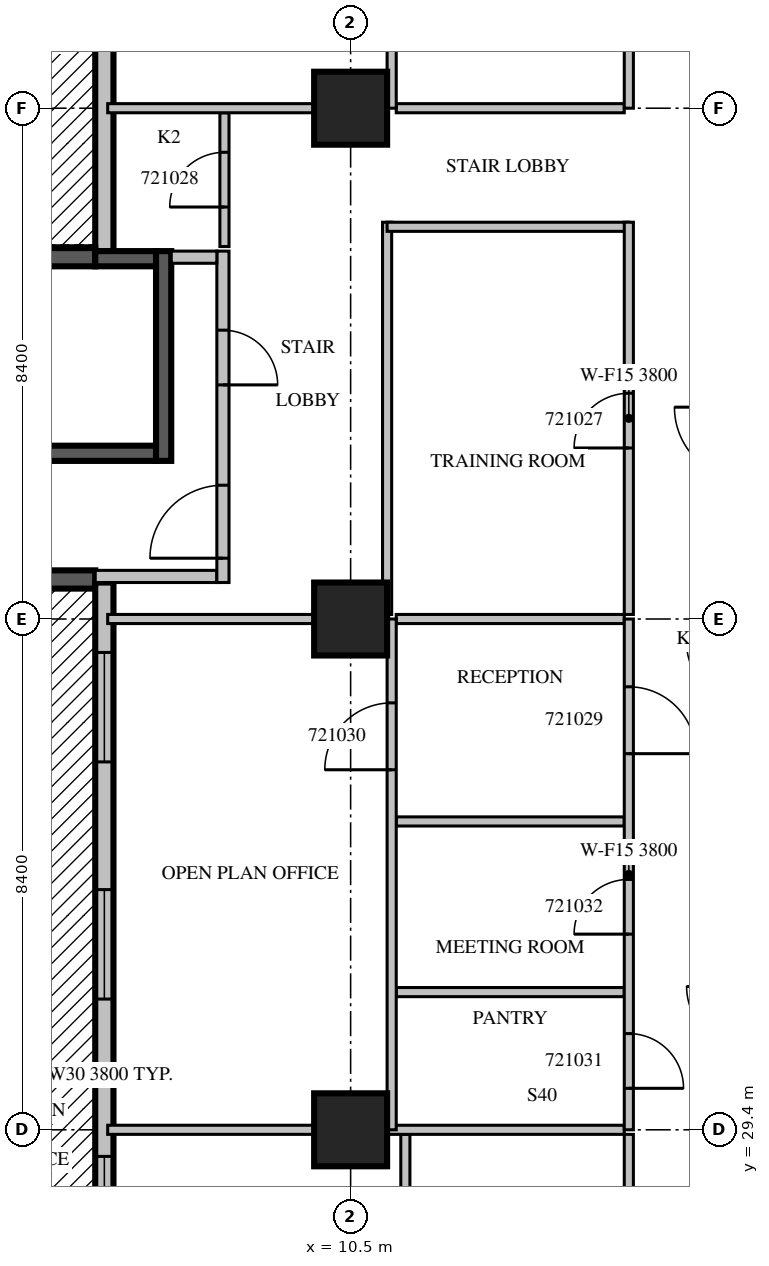
"""IFC4 building model, lengths in metres.
Left out: names, types, materials, properties, quantities, classifications, styles, units other than length and angle.
Written with IfcOpenShell. Run it as: python <this file> out.ifc"""

import sys

from ifc_helpers import new_model, si_unit, direction, frame, frame_2d, origin, origin_2d, place, context, subcontext, project, spatial, rectangle, extrude, source, transform, mapped, element, fill, save


model = new_model("IFC4")
c1 = context("Model", 3, precision=1e-05, world=origin(), true_north=direction((0.0, 1.0)))
c2 = subcontext(c1, "Body", "Model", "MODEL_VIEW")
j1 = project(units=[si_unit("LENGTHUNIT", "METRE"), si_unit("PLANEANGLEUNIT", "RADIAN")], contexts=[c1])
p1 = place(None, origin())
s1 = spatial("IfcSite", under=j1, at=p1, CompositionType="ELEMENT")
p2 = place(p1, origin())
s2 = spatial("IfcBuilding", under=s1, at=p2, CompositionType="ELEMENT")
p3 = place(p2, frame((0.0, 0.0, 99.3)))
s3 = spatial("IfcBuildingStorey", under=s2, at=p3, CompositionType="ELEMENT", Elevation=99.3)
m1 = source(origin(), c2, "Body", "SweptSolid", [
    extrude(rectangle(XDim=1.2, YDim=1.2, at=origin_2d()), origin(), (0.0, 0.0, 1.0), 4.2),
])
for number, where, z_axis, x_axis in (
    (1, (10.5, 29.4, 0.0), (0.0, 0.0, 1.0), (1.0, 0.0, 0.0)),
    (2, (10.5, 37.8, 0.0), (0.0, 0.0, 1.0), (1.0, 0.0, 0.0)),
    (3, (10.5, 46.2, 0.0), (0.0, 0.0, 1.0), (1.0, 0.0, 0.0)),
):
    element("IfcColumn", number, at=place(p3, frame(where, z_axis=z_axis, x_axis=x_axis)), inside=s3, PredefinedType="COLUMN", context=c2, shape_type="MappedRepresentation", body=[
        mapped(m1, transform((0.0, 0.0, 0.0), scale=1.0)),
    ])
p4 = place(p3, frame((6.45, 53.76, 0.0), z_axis=(0.0, 0.0, 1.0), x_axis=(0.0, -1.0, 0.0)))
e4 = element("IfcWall", 4, at=p4, inside=s3, PredefinedType="STANDARD", context=c2, shape_type="SweptSolid", body=[
    extrude(rectangle(XDim=9.91, YDim=0.3, at=frame_2d((4.955, 0.0))), origin(), (0.0, 0.0, 1.0), 3.8),
])
m2 = source(origin(), c2, "Body", "SweptSolid", [
    extrude(rectangle(XDim=1.8, YDim=2.4, at=frame_2d((0.9, 1.2))), frame((0.0, 0.16, 0.0), z_axis=(0.0, -1.0, 0.0), x_axis=(1.0, 0.0, 0.0)), (0.0, 0.0, 1.0), 0.32),
])
p5 = place(p4, frame((4.29, 0.0, 0.0)))
e5 = element("IfcOpeningElement", 5, at=p5, cuts=e4, PredefinedType="OPENING", context=c2, shape_type="MappedRepresentation", body=[
    mapped(m2, transform((0.0, 0.0, 0.0), scale=1.0)),
])
m3 = source(origin(), c2, "Body", "SweptSolid", [
    extrude(rectangle(XDim=2.4, YDim=2.7, at=frame_2d((1.2, 1.35))), frame((0.0, 0.16, 0.0), z_axis=(0.0, -1.0, 0.0), x_axis=(1.0, 0.0, 0.0)), (0.0, 0.0, 1.0), 0.32),
])
p6 = place(p4, frame((0.895, 0.0, 0.6)))
e6 = element("IfcOpeningElement", 6, at=p6, cuts=e4, PredefinedType="OPENING", context=c2, shape_type="MappedRepresentation", body=[
    mapped(m3, transform((0.0, 0.0, 0.0), scale=1.0)),
])
p7 = place(p3, frame((6.3, 43.75, 0.0), z_axis=(0.0, 0.0, 1.0), x_axis=(-1.0, 0.0, 0.0)))
e7 = element("IfcWall", 7, at=p7, inside=s3, PredefinedType="SOLIDWALL", context=c2, shape_type="SweptSolid", body=[
    extrude(rectangle(XDim=6.1, YDim=0.3, at=frame_2d((3.05, 0.0))), origin(), (0.0, 0.0, 1.0), 3.8),
])
m4 = source(origin(), c2, "Body", "SweptSolid", [
    extrude(rectangle(XDim=6.1, YDim=0.3, at=frame_2d((3.05, 0.0))), origin(), (0.0, 0.0, 1.0), 3.8),
])
p8 = place(p3, frame((0.2, 38.45, 0.0), z_axis=(0.0, 0.0, 1.0), x_axis=(1.0, 0.0, 0.0)))
e8 = element("IfcWall", 8, at=p8, inside=s3, PredefinedType="SOLIDWALL", context=c2, shape_type="MappedRepresentation", body=[
    mapped(m4, transform((0.0, 0.0, 0.0), scale=1.0)),
])
p9 = place(p3, frame((6.45, 38.4, 0.0), z_axis=(0.0, 0.0, 1.0), x_axis=(0.0, -1.0, 0.0)))
e9 = element("IfcWall", 9, at=p9, inside=s3, PredefinedType="STANDARD", context=c2, shape_type="SweptSolid", body=[
    extrude(rectangle(XDim=16.2, YDim=0.3, at=frame_2d((8.1, 0.0))), origin(), (0.0, 0.0, 1.0), 3.8),
])
p10 = place(p9, frame((1.15, 0.0, 0.0)))
e10 = element("IfcOpeningElement", 10, at=p10, cuts=e9, PredefinedType="OPENING", context=c2, shape_type="MappedRepresentation", body=[
    mapped(m2, transform((0.0, 0.0, 0.0), scale=1.0)),
])
p11 = place(p9, frame((5.05, 0.0, 0.0)))
e11 = element("IfcOpeningElement", 11, at=p11, cuts=e9, PredefinedType="OPENING", context=c2, shape_type="MappedRepresentation", body=[
    mapped(m2, transform((0.0, 0.0, 0.0), scale=1.0)),
])
m5 = source(origin(), c2, "Body", "SweptSolid", [
    extrude(rectangle(XDim=1.8, YDim=2.7, at=frame_2d((0.9, 1.35))), frame((0.0, 0.16, 0.0), z_axis=(0.0, -1.0, 0.0), x_axis=(1.0, 0.0, 0.0)), (0.0, 0.0, 1.0), 0.32),
])
p12 = place(p9, frame((9.438, 0.0, 0.6)))
e12 = element("IfcOpeningElement", 12, at=p12, cuts=e9, PredefinedType="OPENING", context=c2, shape_type="MappedRepresentation", body=[
    mapped(m5, transform((0.0, 0.0, 0.0), scale=1.0)),
])
p13 = place(p9, frame((13.3, 0.0, 0.0)))
e13 = element("IfcOpeningElement", 13, at=p13, cuts=e9, PredefinedType="OPENING", context=c2, shape_type="MappedRepresentation", body=[
    mapped(m2, transform((0.0, 0.0, 0.0), scale=1.0)),
])
m6 = source(origin(), c2, "Body", "SweptSolid", [
    extrude(rectangle(XDim=7.0, YDim=0.25, at=frame_2d((3.5, 0.0))), origin(), (0.0, 0.0, 1.0), 3.8),
])
p14 = place(p3, frame((0.3, 40.525, 0.0), z_axis=(0.0, 0.0, 1.0), x_axis=(1.0, 0.0, 0.0)))
e14 = element("IfcWall", 14, at=p14, inside=s3, PredefinedType="SOLIDWALL", context=c2, shape_type="MappedRepresentation", body=[
    mapped(m6, transform((0.0, 0.0, 0.0), scale=1.0)),
])
m7 = source(origin(), c2, "Body", "SweptSolid", [
    extrude(rectangle(XDim=1.1, YDim=2.1, at=frame_2d((0.55, 1.05))), frame((0.0, 0.135, 0.0), z_axis=(0.0, -1.0, 0.0), x_axis=(1.0, 0.0, 0.0)), (0.0, 0.0, 1.0), 0.27),
])
p15 = place(p14, frame((0.55, 0.0, 0.0)))
e15 = element("IfcOpeningElement", 15, at=p15, cuts=e14, PredefinedType="OPENING", context=c2, shape_type="MappedRepresentation", body=[
    mapped(m7, transform((0.0, 0.0, 0.0), scale=1.0)),
])
p16 = place(p3, frame((6.3, 43.725, 0.0), z_axis=(0.0, 0.0, 1.0), x_axis=(1.0, 0.0, 0.0)))
e16 = element("IfcWall", 16, at=p16, inside=s3, PredefinedType="SOLIDWALL", context=c2, shape_type="SweptSolid", body=[
    extrude(rectangle(XDim=1.0, YDim=0.25, at=frame_2d((0.5, 0.0))), origin(), (0.0, 0.0, 1.0), 3.8),
])
m8 = source(origin(), c2, "Body", "SweptSolid", [
    extrude(rectangle(XDim=3.45, YDim=0.25, at=frame_2d((1.725, 0.0))), origin(), (0.0, 0.0, 1.0), 3.8),
])
p17 = place(p3, frame((7.425, 40.4, 0.0), z_axis=(0.0, 0.0, 1.0), x_axis=(0.0, 1.0, 0.0)))
e17 = element("IfcWall", 17, at=p17, inside=s3, PredefinedType="SOLIDWALL", context=c2, shape_type="MappedRepresentation", body=[
    mapped(m8, transform((0.0, 0.0, 0.0), scale=1.0)),
])
p18 = place(p3, frame((6.3, 38.5, 0.0), z_axis=(0.0, 0.0, 1.0), x_axis=(1.0, 0.0, 0.0)))
e18 = element("IfcWall", 18, at=p18, inside=s3, PredefinedType="PARTITIONING", context=c2, shape_type="SweptSolid", body=[
    extrude(rectangle(XDim=2.0, YDim=0.2, at=frame_2d((1.0, 0.0))), origin(), (0.0, 0.0, 1.0), 3.8),
])
m9 = source(origin(), c2, "Body", "SweptSolid", [
    extrude(rectangle(XDim=5.45, YDim=0.2, at=frame_2d((2.725, 0.0))), origin(), (0.0, 0.0, 1.0), 3.8),
])
p19 = place(p3, frame((8.4, 38.4, 0.0), z_axis=(0.0, 0.0, 1.0), x_axis=(0.0, 1.0, 0.0)))
e19 = element("IfcWall", 19, at=p19, inside=s3, PredefinedType="PARTITIONING", context=c2, shape_type="MappedRepresentation", body=[
    mapped(m9, transform((0.0, 0.0, 0.0), scale=1.0)),
])
m10 = source(origin(), c2, "Body", "SweptSolid", [
    extrude(rectangle(XDim=1.2, YDim=2.1, at=frame_2d((0.6, 1.05))), frame((0.0, 0.11, 0.0), z_axis=(0.0, -1.0, 0.0), x_axis=(1.0, 0.0, 0.0)), (0.0, 0.0, 1.0), 0.22),
])
p20 = place(p19, frame((0.4, 0.0, 0.0)))
e20 = element("IfcOpeningElement", 20, at=p20, cuts=e19, PredefinedType="OPENING", context=c2, shape_type="MappedRepresentation", body=[
    mapped(m10, transform((0.0, 0.0, 0.0), scale=1.0)),
])
m11 = source(origin(), c2, "Body", "SweptSolid", [
    extrude(rectangle(XDim=0.9, YDim=2.1, at=frame_2d((0.45, 1.05))), frame((0.0, 0.11, 0.0), z_axis=(0.0, -1.0, 0.0), x_axis=(1.0, 0.0, 0.0)), (0.0, 0.0, 1.0), 0.22),
])
p21 = place(p19, frame((3.25, 0.0, 0.0)))
e21 = element("IfcOpeningElement", 21, at=p21, cuts=e19, PredefinedType="OPENING", context=c2, shape_type="MappedRepresentation", body=[
    mapped(m11, transform((0.0, 0.0, 0.0), scale=1.0)),
])
m12 = source(origin(), c2, "Body", "SweptSolid", [
    extrude(rectangle(XDim=0.75, YDim=0.2, at=frame_2d((0.375, 0.0))), origin(), (0.0, 0.0, 1.0), 3.8),
])
p22 = place(p3, frame((7.55, 43.75, 0.0), z_axis=(0.0, 0.0, 1.0), x_axis=(1.0, 0.0, 0.0)))
e22 = element("IfcWall", 22, at=p22, inside=s3, PredefinedType="PARTITIONING", context=c2, shape_type="MappedRepresentation", body=[
    mapped(m12, transform((0.0, 0.0, 0.0), scale=1.0)),
])
m13 = source(origin(), c2, "Body", "SweptSolid", [
    extrude(rectangle(XDim=3.65, YDim=0.15, at=frame_2d((1.825, 0.0))), origin(), (0.0, 0.0, 1.0), 3.8),
])
for number, where, z_axis, x_axis in (
    (23, (11.4, 25.675, 0.0), (0.0, 0.0, 1.0), (0.0, 1.0, 0.0)),
    (24, (15.075, 25.675, 0.0), (0.0, 0.0, 1.0), (0.0, 1.0, 0.0)),
):
    element("IfcWall", number, at=place(p3, frame(where, z_axis=z_axis, x_axis=x_axis)), inside=s3, PredefinedType="PARTITIONING", context=c2, shape_type="MappedRepresentation", body=[
        mapped(m13, transform((0.0, 0.0, 0.0), scale=1.0)),
    ])
p23 = place(p3, frame((9.901, 29.4, 0.0), z_axis=(0.0, 0.0, 1.0), x_axis=(-1.0, 0.0, 0.0)))
e25 = element("IfcWall", 25, at=p23, inside=s3, PredefinedType="PARTITIONING", context=c2, shape_type="SweptSolid", body=[
    extrude(rectangle(XDim=3.396, YDim=0.15, at=frame_2d((1.698, 0.0))), origin(), (0.0, 0.0, 1.0), 3.8),
])
m14 = source(origin(), c2, "Body", "SweptSolid", [
    extrude(rectangle(XDim=3.901, YDim=0.15, at=frame_2d((1.95, 0.0))), origin(), (0.0, 0.0, 1.0), 3.8),
])
p24 = place(p3, frame((15.0, 29.4, 0.0), z_axis=(0.0, 0.0, 1.0), x_axis=(-1.0, 0.0, 0.0)))
e26 = element("IfcWall", 26, at=p24, inside=s3, PredefinedType="PARTITIONING", context=c2, shape_type="MappedRepresentation", body=[
    mapped(m14, transform((0.0, 0.0, 0.0), scale=1.0)),
])
m15 = source(origin(), c2, "Body", "SweptSolid", [
    extrude(rectangle(XDim=6.45, YDim=0.15, at=frame_2d((3.225, 0.0))), origin(), (0.0, 0.0, 1.0), 3.8),
])
p25 = place(p3, frame((11.1, 44.325, 0.0), z_axis=(0.0, 0.0, 1.0), x_axis=(0.0, -1.0, 0.0)))
e27 = element("IfcWall", 27, at=p25, inside=s3, PredefinedType="PARTITIONING", context=c2, shape_type="MappedRepresentation", body=[
    mapped(m15, transform((0.0, 0.0, 0.0), scale=1.0)),
])
m16 = source(origin(), c2, "Body", "SweptSolid", [
    extrude(rectangle(XDim=3.975, YDim=0.15, at=frame_2d((1.988, 0.0))), origin(), (0.0, 0.0, 1.0), 3.8),
])
p26 = place(p3, frame((15.075, 44.25, 0.0), z_axis=(0.0, 0.0, 1.0), x_axis=(-1.0, 0.0, 0.0)))
e28 = element("IfcWall", 28, at=p26, inside=s3, PredefinedType="PARTITIONING", context=c2, shape_type="MappedRepresentation", body=[
    mapped(m16, transform((0.0, 0.0, 0.0), scale=1.0)),
])
p27 = place(p3, frame((15.075, 37.875, 0.0), z_axis=(0.0, 0.0, 1.0), x_axis=(0.0, 1.0, 0.0)))
e29 = element("IfcWall", 29, at=p27, inside=s3, PredefinedType="PARTITIONING", context=c2, shape_type="MappedRepresentation", body=[
    mapped(m15, transform((0.0, 0.0, 0.0), scale=1.0)),
])
m17 = source(origin(), c2, "Body", "SweptSolid", [
    extrude(rectangle(XDim=0.9, YDim=2.1, at=frame_2d((0.45, 1.05))), frame((0.0, 0.085, 0.0), z_axis=(0.0, -1.0, 0.0), x_axis=(1.0, 0.0, 0.0)), (0.0, 0.0, 1.0), 0.17),
])
p28 = place(p27, frame((2.737, 0.0, 0.0)))
e30 = element("IfcOpeningElement", 30, at=p28, cuts=e29, PredefinedType="OPENING", context=c2, shape_type="MappedRepresentation", body=[
    mapped(m17, transform((0.0, 0.0, 0.0), scale=1.0)),
])
m18 = source(origin(), c2, "Body", "SweptSolid", [
    extrude(rectangle(XDim=2.2, YDim=0.15, at=frame_2d((1.1, 0.0))), origin(), (0.0, 0.0, 1.0), 3.8),
])
p29 = place(p3, frame((8.425, 43.925, 0.0), z_axis=(0.0, 0.0, 1.0), x_axis=(0.0, 1.0, 0.0)))
e31 = element("IfcWall", 31, at=p29, inside=s3, PredefinedType="PARTITIONING", context=c2, shape_type="MappedRepresentation", body=[
    mapped(m18, transform((0.0, 0.0, 0.0), scale=1.0)),
])
p30 = place(p29, frame((0.65, 0.0, 0.0)))
e32 = element("IfcOpeningElement", 32, at=p30, cuts=e31, PredefinedType="OPENING", context=c2, shape_type="MappedRepresentation", body=[
    mapped(m17, transform((0.0, 0.0, 0.0), scale=1.0)),
])
m19 = source(origin(), c2, "Body", "SweptSolid", [
    extrude(rectangle(XDim=3.75, YDim=0.15, at=frame_2d((1.875, 0.0))), origin(), (0.0, 0.0, 1.0), 3.8),
])
for number, where, z_axis, x_axis in (
    (33, (15.0, 31.665, 0.0), (0.0, 0.0, 1.0), (-1.0, 0.0, 0.0)),
    (34, (15.0, 34.471, 0.0), (0.0, 0.0, 1.0), (-1.0, 0.0, 0.0)),
):
    element("IfcWall", number, at=place(p3, frame(where, z_axis=z_axis, x_axis=x_axis)), inside=s3, PredefinedType="PARTITIONING", context=c2, shape_type="MappedRepresentation", body=[
        mapped(m19, transform((0.0, 0.0, 0.0), scale=1.0)),
    ])
m20 = source(origin(), c2, "Body", "SweptSolid", [
    extrude(rectangle(XDim=3.396, YDim=0.15, at=frame_2d((1.698, 0.0))), origin(), (0.0, 0.0, 1.0), 3.8),
])
p31 = place(p3, frame((9.901, 37.8, 0.0), z_axis=(0.0, 0.0, 1.0), x_axis=(-1.0, 0.0, 0.0)))
e35 = element("IfcWall", 35, at=p31, inside=s3, PredefinedType="PARTITIONING", context=c2, shape_type="MappedRepresentation", body=[
    mapped(m20, transform((0.0, 0.0, 0.0), scale=1.0)),
])
p32 = place(p3, frame((15.0, 37.8, 0.0), z_axis=(0.0, 0.0, 1.0), x_axis=(-1.0, 0.0, 0.0)))
e36 = element("IfcWall", 36, at=p32, inside=s3, PredefinedType="PARTITIONING", context=c2, shape_type="MappedRepresentation", body=[
    mapped(m19, transform((0.0, 0.0, 0.0), scale=1.0)),
])
m21 = source(origin(), c2, "Body", "SweptSolid", [
    extrude(rectangle(XDim=8.4, YDim=0.15, at=frame_2d((4.2, 0.0))), origin(), (0.0, 0.0, 1.0), 3.8),
])
p33 = place(p3, frame((11.175, 29.4, 0.0), z_axis=(0.0, 0.0, 1.0), x_axis=(0.0, 1.0, 0.0)))
e37 = element("IfcWall", 37, at=p33, inside=s3, PredefinedType="PARTITIONING", context=c2, shape_type="MappedRepresentation", body=[
    mapped(m21, transform((0.0, 0.0, 0.0), scale=1.0)),
])
m22 = source(origin(), c2, "Body", "SweptSolid", [
    extrude(rectangle(XDim=1.1, YDim=2.1, at=frame_2d((0.55, 1.05))), frame((0.0, 0.085, 0.0), z_axis=(0.0, -1.0, 0.0), x_axis=(1.0, 0.0, 0.0)), (0.0, 0.0, 1.0), 0.17),
])
p34 = place(p33, frame((5.921, 0.0, 0.0)))
e38 = element("IfcOpeningElement", 38, at=p34, cuts=e37, PredefinedType="OPENING", context=c2, shape_type="MappedRepresentation", body=[
    mapped(m22, transform((0.0, 0.0, 0.0), scale=1.0)),
])
p35 = place(p3, frame((9.901, 46.2, 0.0), z_axis=(0.0, 0.0, 1.0), x_axis=(-1.0, 0.0, 0.0)))
e39 = element("IfcWall", 39, at=p35, inside=s3, PredefinedType="PARTITIONING", context=c2, shape_type="MappedRepresentation", body=[
    mapped(m20, transform((0.0, 0.0, 0.0), scale=1.0)),
])
p36 = place(p3, frame((15.0, 46.2, 0.0), z_axis=(0.0, 0.0, 1.0), x_axis=(-1.0, 0.0, 0.0)))
e40 = element("IfcWall", 40, at=p36, inside=s3, PredefinedType="PARTITIONING", context=c2, shape_type="MappedRepresentation", body=[
    mapped(m19, transform((0.0, 0.0, 0.0), scale=1.0)),
])
p37 = place(p3, frame((11.175, 46.2, 0.0), z_axis=(0.0, 0.0, 1.0), x_axis=(0.0, 1.0, 0.0)))
e41 = element("IfcWall", 41, at=p37, inside=s3, PredefinedType="PARTITIONING", context=c2, shape_type="SweptSolid", body=[
    extrude(rectangle(XDim=7.26, YDim=0.15, at=frame_2d((3.63, 0.0))), origin(), (0.0, 0.0, 1.0), 3.8),
])
p38 = place(p37, frame((1.752, 0.0, 0.0)))
e42 = element("IfcOpeningElement", 42, at=p38, cuts=e41, PredefinedType="OPENING", context=c2, shape_type="MappedRepresentation", body=[
    mapped(m17, transform((0.0, 0.0, 0.0), scale=1.0)),
])
p39 = place(p37, frame((4.117, 0.0, 0.0)))
e43 = element("IfcOpeningElement", 43, at=p39, cuts=e41, PredefinedType="OPENING", context=c2, shape_type="MappedRepresentation", body=[
    mapped(m17, transform((0.0, 0.0, 0.0), scale=1.0)),
])
p40 = place(p3, frame((15.075, 29.4, 0.0), z_axis=(0.0, 0.0, 1.0), x_axis=(0.0, 1.0, 0.0)))
e44 = element("IfcWall", 44, at=p40, inside=s3, PredefinedType="PARTITIONING", context=c2, shape_type="MappedRepresentation", body=[
    mapped(m21, transform((0.0, 0.0, 0.0), scale=1.0)),
])
p41 = place(p40, frame((6.185, 0.0, 0.0)))
e45 = element("IfcOpeningElement", 45, at=p41, cuts=e44, PredefinedType="OPENING", context=c2, shape_type="MappedRepresentation", body=[
    mapped(m22, transform((0.0, 0.0, 0.0), scale=1.0)),
])
p42 = place(p40, frame((0.682, 0.0, 0.0)))
e46 = element("IfcOpeningElement", 46, at=p42, cuts=e44, PredefinedType="OPENING", context=c2, shape_type="MappedRepresentation", body=[
    mapped(m17, transform((0.0, 0.0, 0.0), scale=1.0)),
])
p43 = place(p40, frame((3.218, 0.0, 0.0)))
e47 = element("IfcOpeningElement", 47, at=p43, cuts=e44, PredefinedType="OPENING", context=c2, shape_type="MappedRepresentation", body=[
    mapped(m17, transform((0.0, 0.0, 0.0), scale=1.0)),
])
m23 = source(origin(), c2, "Body", "SweptSolid", [
    extrude(rectangle(XDim=7.26, YDim=0.15, at=frame_2d((3.63, 0.0))), origin(), (0.0, 0.0, 1.0), 3.8),
])
p44 = place(p3, frame((15.075, 46.2, 0.0), z_axis=(0.0, 0.0, 1.0), x_axis=(0.0, 1.0, 0.0)))
e48 = element("IfcWall", 48, at=p44, inside=s3, PredefinedType="PARTITIONING", context=c2, shape_type="MappedRepresentation", body=[
    mapped(m23, transform((0.0, 0.0, 0.0), scale=1.0)),
])
m24 = source(origin(), c2, "Body", "SweptSolid", [
    extrude(rectangle(XDim=1.2, YDim=2.1, at=frame_2d((0.6, 1.05))), frame((0.0, 0.085, 0.0), z_axis=(0.0, -1.0, 0.0), x_axis=(1.0, 0.0, 0.0)), (0.0, 0.0, 1.0), 0.17),
])
p45 = place(p44, frame((3.067, 0.0, 0.0)))
e49 = element("IfcOpeningElement", 49, at=p45, cuts=e48, PredefinedType="OPENING", context=c2, shape_type="MappedRepresentation", body=[
    mapped(m24, transform((0.0, 0.0, 0.0), scale=1.0)),
])
m25 = source(origin(), c2, "Body", "SweptSolid", [
    extrude(rectangle(XDim=1.8, YDim=2.4, at=frame_2d((0.9, 1.2))), frame((0.0, 0.025, 0.0), z_axis=(0.0, -1.0, 0.0), x_axis=(1.0, 0.0, 0.0)), (0.0, 0.0, 1.0), 0.05),
])
p46 = place(p10, origin())
e50 = element("IfcDoor", 50, at=p46, inside=s3, OperationType="SLIDING_TO_LEFT", PredefinedType="DOOR", context=c2, shape_type="MappedRepresentation", body=[
    mapped(m25, transform((0.0, 0.0, 0.0), scale=1.0)),
])
fill(e10, e50)
p47 = place(p11, origin())
e51 = element("IfcDoor", 51, at=p47, inside=s3, OperationType="SLIDING_TO_LEFT", PredefinedType="DOOR", context=c2, shape_type="MappedRepresentation", body=[
    mapped(m25, transform((0.0, 0.0, 0.0), scale=1.0)),
])
fill(e11, e51)
m26 = source(origin(), c2, "Body", "SweptSolid", [
    extrude(rectangle(XDim=1.8, YDim=2.7, at=frame_2d((0.9, 1.35))), frame((0.0, 0.03, 0.0), z_axis=(0.0, -1.0, 0.0), x_axis=(1.0, 0.0, 0.0)), (0.0, 0.0, 1.0), 0.06),
])
p48 = place(p12, origin())
e52 = element("IfcWindow", 52, at=p48, inside=s3, PartitioningType="SINGLE_PANEL", PredefinedType="WINDOW", context=c2, shape_type="MappedRepresentation", body=[
    mapped(m26, transform((0.0, 0.0, 0.0), scale=1.0)),
])
fill(e12, e52)
m27 = source(origin(), c2, "Body", "SweptSolid", [
    extrude(rectangle(XDim=1.2, YDim=2.1, at=frame_2d((0.6, 1.05))), frame((0.0, 0.025, 0.0), z_axis=(0.0, -1.0, 0.0), x_axis=(1.0, 0.0, 0.0)), (0.0, 0.0, 1.0), 0.05),
])
p49 = place(p20, origin())
e53 = element("IfcDoor", 53, at=p49, inside=s3, OperationType="SINGLE_SWING_LEFT", PredefinedType="DOOR", context=c2, shape_type="MappedRepresentation", body=[
    mapped(m27, transform((0.0, 0.0, 0.0), scale=1.0)),
])
fill(e20, e53)
m28 = source(origin(), c2, "Body", "SweptSolid", [
    extrude(rectangle(XDim=0.9, YDim=2.1, at=frame_2d((0.45, 1.05))), frame((0.0, 0.025, 0.0), z_axis=(0.0, -1.0, 0.0), x_axis=(1.0, 0.0, 0.0)), (0.0, 0.0, 1.0), 0.05),
])
p50 = place(p21, origin())
e54 = element("IfcDoor", 54, at=p50, inside=s3, OperationType="SINGLE_SWING_RIGHT", PredefinedType="DOOR", context=c2, shape_type="MappedRepresentation", body=[
    mapped(m28, transform((0.0, 0.0, 0.0), scale=1.0)),
])
fill(e21, e54)
p51 = place(p28, origin())
e55 = element("IfcDoor", 55, at=p51, inside=s3, OperationType="SINGLE_SWING_LEFT", PredefinedType="DOOR", context=c2, shape_type="MappedRepresentation", body=[
    mapped(m28, transform((0.0, 0.0, 0.0), scale=1.0)),
])
fill(e30, e55)
p52 = place(p30, origin())
e56 = element("IfcDoor", 56, at=p52, inside=s3, OperationType="SINGLE_SWING_LEFT", PredefinedType="DOOR", context=c2, shape_type="MappedRepresentation", body=[
    mapped(m28, transform((0.0, 0.0, 0.0), scale=1.0)),
])
fill(e32, e56)
m29 = source(origin(), c2, "Body", "SweptSolid", [
    extrude(rectangle(XDim=1.1, YDim=2.1, at=frame_2d((0.55, 1.05))), frame((0.0, 0.025, 0.0), z_axis=(0.0, -1.0, 0.0), x_axis=(1.0, 0.0, 0.0)), (0.0, 0.0, 1.0), 0.05),
])
p53 = place(p41, origin())
e57 = element("IfcDoor", 57, at=p53, inside=s3, OperationType="SINGLE_SWING_RIGHT", PredefinedType="DOOR", context=c2, shape_type="MappedRepresentation", body=[
    mapped(m29, transform((0.0, 0.0, 0.0), scale=1.0)),
])
fill(e45, e57)
p54 = place(p34, origin())
e58 = element("IfcDoor", 58, at=p54, inside=s3, OperationType="SINGLE_SWING_LEFT", PredefinedType="DOOR", context=c2, shape_type="MappedRepresentation", body=[
    mapped(m29, transform((0.0, 0.0, 0.0), scale=1.0)),
])
fill(e38, e58)
p55 = place(p42, origin())
e59 = element("IfcDoor", 59, at=p55, inside=s3, OperationType="SINGLE_SWING_RIGHT", PredefinedType="DOOR", context=c2, shape_type="MappedRepresentation", body=[
    mapped(m28, transform((0.0, 0.0, 0.0), scale=1.0)),
])
fill(e46, e59)
p56 = place(p43, origin())
e60 = element("IfcDoor", 60, at=p56, inside=s3, OperationType="SINGLE_SWING_LEFT", PredefinedType="DOOR", context=c2, shape_type="MappedRepresentation", body=[
    mapped(m28, transform((0.0, 0.0, 0.0), scale=1.0)),
])
fill(e47, e60)
save(model, sys.argv[1])
